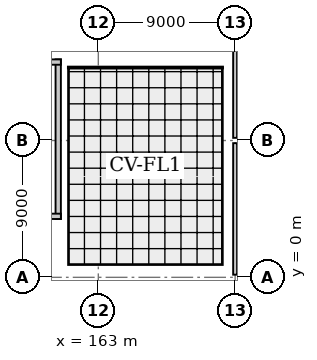
"""IFC4 building model, lengths in metres.
Left out: names, types, materials, properties, quantities, classifications, styles, units other than length and angle.
Written with IfcOpenShell. Run it as: python <this file> out.ifc"""

import sys

from ifc_helpers import new_model, si_unit, direction, frame, frame_2d, origin, origin_2d, place, context, subcontext, project, spatial, rectangle, i_section, extrude, element, fill, save


model = new_model("IFC4")
c1 = context("Model", 3, precision=1e-05, world=origin(), true_north=direction((0.0, 1.0)))
c2 = subcontext(c1, "Body", "Model", "MODEL_VIEW")
j1 = project(units=[si_unit("LENGTHUNIT", "METRE"), si_unit("PLANEANGLEUNIT", "RADIAN")], contexts=[c1])
p1 = place(None, origin())
s1 = spatial("IfcSite", under=j1, at=p1, CompositionType="ELEMENT")
p2 = place(p1, origin())
s2 = spatial("IfcBuilding", under=s1, at=p2, CompositionType="ELEMENT")
p3 = place(p2, frame((0.0, 0.0, 14.4)))
s3 = spatial("IfcBuildingStorey", under=s2, at=p3, CompositionType="ELEMENT", Elevation=14.4)
for number, where, z_axis, x_axis in (
    (1, (163.0, 0.0, 0.0), (0.0, 0.0, 1.0), (1.0, 0.0, 0.0)),
    (2, (163.0, 9.0, 0.0), (0.0, 0.0, 1.0), (1.0, 0.0, 0.0)),
    (3, (172.0, 0.0, 0.0), (0.0, 0.0, 1.0), (1.0, 0.0, 0.0)),
    (4, (172.0, 9.0, 0.0), (0.0, 0.0, 1.0), (1.0, 0.0, 0.0)),
):
    element("IfcColumn", number, at=place(p3, frame(where, z_axis=z_axis, x_axis=x_axis)), inside=s3, PredefinedType="COLUMN", context=c2, shape_type="SweptSolid", body=[
        extrude(i_section(OverallWidth=0.35, OverallDepth=0.35, WebThickness=0.012, FlangeThickness=0.019, FilletRadius=0.02, at=origin_2d()), origin(), (0.0, 0.0, 1.0), 3.2),
    ])
p4 = place(p3, frame((172.0, 17.825, 0.0), z_axis=(0.0, 0.0, 1.0), x_axis=(0.0, -1.0, 0.0)))
e5 = element("IfcWall", 5, at=p4, inside=s3, PredefinedType="SOLIDWALL", context=c2, shape_type="SweptSolid", body=[
    extrude(rectangle(XDim=8.65, YDim=0.26, at=frame_2d((4.325, 0.0))), origin(), (0.0, 0.0, 1.0), 2.42),
])
p5 = place(p4, frame((3.625, 0.0, 0.75)))
e6 = element("IfcOpeningElement", 6, at=p5, cuts=e5, PredefinedType="OPENING", context=c2, shape_type="SweptSolid", body=[
    extrude(rectangle(XDim=1.4, YDim=1.55, at=frame_2d((0.7, 0.775))), frame((0.0, 0.14, 0.0), z_axis=(0.0, -1.0, 0.0), x_axis=(1.0, 0.0, 0.0)), (0.0, 0.0, 1.0), 0.28),
])
p6 = place(p3, frame((172.0, 8.825, 0.0), z_axis=(0.0, 0.0, 1.0), x_axis=(0.0, -1.0, 0.0)))
e7 = element("IfcWall", 7, at=p6, inside=s3, PredefinedType="SOLIDWALL", context=c2, shape_type="SweptSolid", body=[
    extrude(rectangle(XDim=8.65, YDim=0.26, at=frame_2d((4.325, 0.0))), origin(), (0.0, 0.0, 1.0), 2.51),
])
p7 = place(p6, frame((3.162, 0.0, 0.0)))
e8 = element("IfcOpeningElement", 8, at=p7, cuts=e7, PredefinedType="OPENING", context=c2, shape_type="SweptSolid", body=[
    extrude(rectangle(XDim=1.2, YDim=2.1, at=frame_2d((0.6, 1.05))), frame((0.0, 0.14, 0.0), z_axis=(0.0, -1.0, 0.0), x_axis=(1.0, 0.0, 0.0)), (0.0, 0.0, 1.0), 0.28),
])
p8 = place(p3, frame((160.363, 3.837, 0.0), z_axis=(0.0, 0.0, 1.0), x_axis=(0.0, 1.0, 0.0)))
e9 = element("IfcWall", 9, at=p8, inside=s3, PredefinedType="SHEAR", context=c2, shape_type="SweptSolid", body=[
    extrude(rectangle(XDim=10.498, YDim=0.35, at=frame_2d((5.249, 0.0))), origin(), (0.0, 0.0, 1.0), 2.995),
])
for number, where, z_axis, x_axis in (
    (10, (160.538, 14.16, 0.0), (0.0, 0.0, 1.0), (-1.0, 0.0, 0.0)),
    (11, (156.218, 4.012, 0.0), (0.0, 0.0, 1.0), (1.0, 0.0, 0.0)),
):
    element("IfcWall", number, at=place(p3, frame(where, z_axis=z_axis, x_axis=x_axis)), inside=s3, PredefinedType="SHEAR", context=c2, shape_type="SweptSolid", body=[
        extrude(rectangle(XDim=4.32, YDim=0.35, at=frame_2d((2.16, 0.0))), origin(), (0.0, 0.0, 1.0), 2.995),
    ])
p9 = place(p3, frame((161.0, 13.8, 0.0), z_axis=(0.0, 0.0, 1.0), x_axis=(1.0, 0.0, 0.0)))
e12 = element("IfcWall", 12, at=p9, inside=s3, PredefinedType="PARTITIONING", context=c2, shape_type="SweptSolid", body=[
    extrude(rectangle(XDim=10.2, YDim=0.12, at=frame_2d((5.1, 0.0))), origin(), (0.0, 0.0, 1.0), 2.58),
])
p10 = place(p9, frame((4.425, 0.0, 0.0)))
e13 = element("IfcOpeningElement", 13, at=p10, cuts=e12, PredefinedType="OPENING", context=c2, shape_type="SweptSolid", body=[
    extrude(rectangle(XDim=1.35, YDim=2.1, at=frame_2d((0.675, 1.05))), frame((0.0, 0.07, 0.0), z_axis=(0.0, -1.0, 0.0), x_axis=(1.0, 0.0, 0.0)), (0.0, 0.0, 1.0), 0.14),
])
p11 = place(p5, origin())
e14 = element("IfcWindow", 14, at=p11, inside=s3, PartitioningType="SINGLE_PANEL", PredefinedType="WINDOW", context=c2, shape_type="SweptSolid", body=[
    extrude(rectangle(XDim=1.4, YDim=1.55, at=frame_2d((0.7, 0.775))), frame((0.0, 0.03, 0.0), z_axis=(0.0, -1.0, 0.0), x_axis=(1.0, 0.0, 0.0)), (0.0, 0.0, 1.0), 0.06),
])
fill(e6, e14)
p12 = place(p7, origin())
e15 = element("IfcDoor", 15, at=p12, inside=s3, OperationType="SINGLE_SWING_LEFT", PredefinedType="DOOR", context=c2, shape_type="SweptSolid", body=[
    extrude(rectangle(XDim=1.2, YDim=2.1, at=frame_2d((0.6, 1.05))), frame((0.0, 0.025, 0.0), z_axis=(0.0, -1.0, 0.0), x_axis=(1.0, 0.0, 0.0)), (0.0, 0.0, 1.0), 0.05),
])
fill(e8, e15)
p13 = place(p10, origin())
e16 = element("IfcDoor", 16, at=p13, inside=s3, OperationType="SINGLE_SWING_LEFT", PredefinedType="DOOR", context=c2, shape_type="SweptSolid", body=[
    extrude(rectangle(XDim=1.35, YDim=2.1, at=frame_2d((0.675, 1.05))), frame((0.0, 0.025, 0.0), z_axis=(0.0, -1.0, 0.0), x_axis=(1.0, 0.0, 0.0)), (0.0, 0.0, 1.0), 0.05),
])
fill(e13, e16)
save(model, sys.argv[1])
